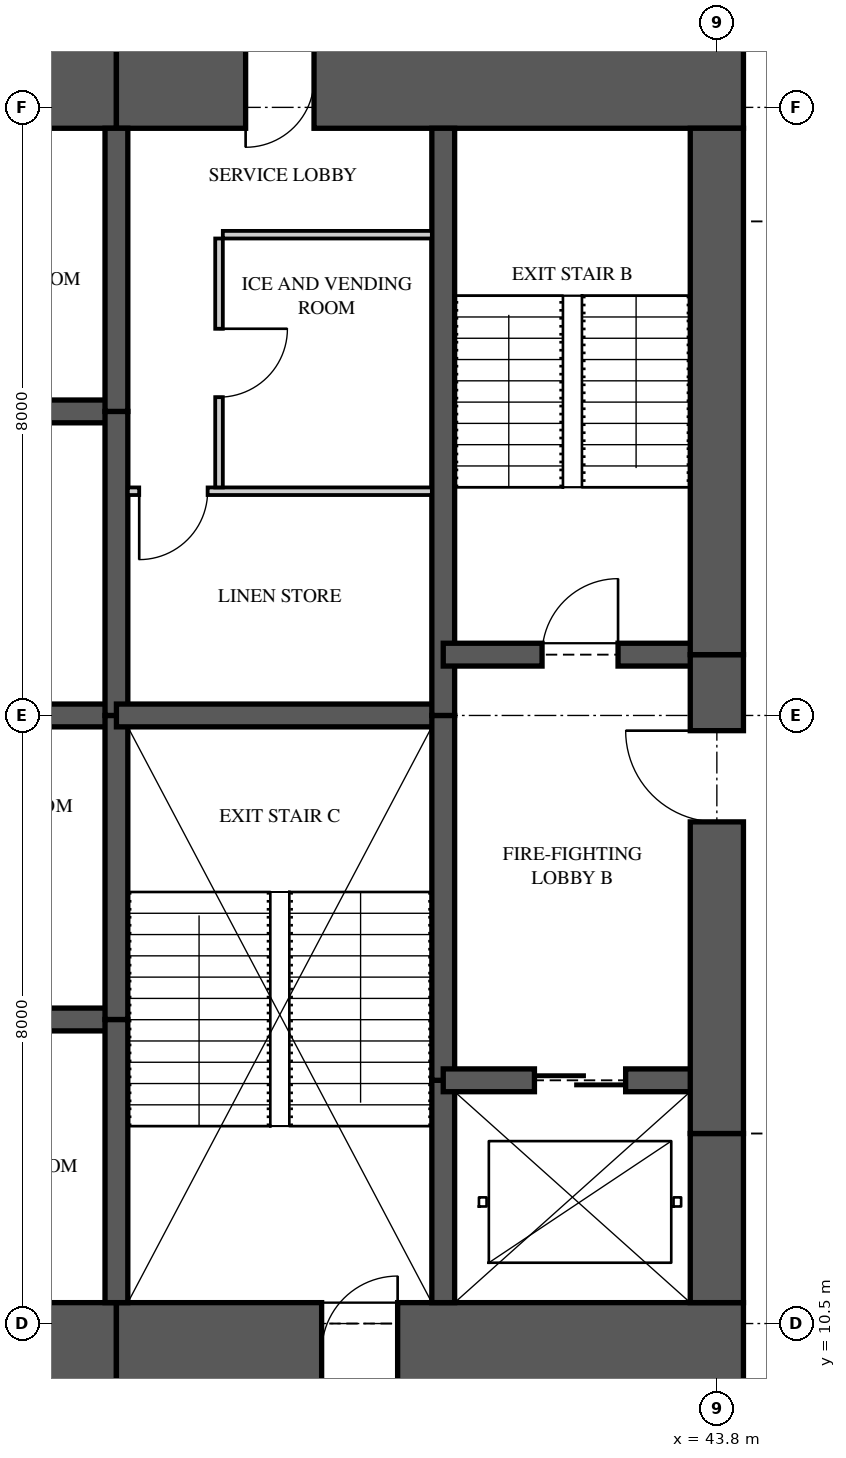
"""IFC4 building model, lengths in metres.
Left out: names, types, materials, properties, quantities, classifications, styles, units other than length and angle.
Written with IfcOpenShell. Run it as: python <this file> out.ifc"""

import sys

from ifc_helpers import new_model, si_unit, direction, frame, frame_2d, origin, place, context, subcontext, project, spatial, rectangle, extrude, element, fill, save


model = new_model("IFC4")
c1 = context("Model", 3, precision=1e-05, world=origin(), true_north=direction((0.0, 1.0)))
c2 = subcontext(c1, "Body", "Model", "MODEL_VIEW")
j1 = project(units=[si_unit("LENGTHUNIT", "METRE"), si_unit("PLANEANGLEUNIT", "RADIAN")], contexts=[c1])
p1 = place(None, origin())
s1 = spatial("IfcSite", under=j1, at=p1, CompositionType="ELEMENT")
p2 = place(p1, origin())
s2 = spatial("IfcBuilding", under=s1, at=p2, CompositionType="ELEMENT")
p3 = place(p2, frame((0.0, 0.0, 157.7)))
s3 = spatial("IfcBuildingStorey", under=s2, at=p3, CompositionType="ELEMENT", Elevation=157.7)
p4 = place(p3, frame((31.6, 10.125, 0.0), z_axis=(0.0, 0.0, 1.0), x_axis=(1.0, 0.0, 0.0)))
e1 = element("IfcWall", 1, at=p4, inside=s3, PredefinedType="SHEAR", context=c2, shape_type="SweptSolid", body=[
    extrude(rectangle(XDim=4.3, YDim=1.3, at=frame_2d((2.15, 0.0))), origin(), (0.0, 0.0, 1.0), 3.35),
])
p5 = place(p3, frame((35.9, 10.125, 0.0), z_axis=(0.0, 0.0, 1.0), x_axis=(1.0, 0.0, 0.0)))
e2 = element("IfcWall", 2, at=p5, inside=s3, PredefinedType="SHEAR", context=c2, shape_type="SweptSolid", body=[
    extrude(rectangle(XDim=8.25, YDim=1.3, at=frame_2d((4.125, 0.0))), origin(), (0.0, 0.0, 1.0), 3.35),
])
p6 = place(p5, frame((2.7, 0.0, 0.0)))
e3 = element("IfcOpeningElement", 3, at=p6, cuts=e2, PredefinedType="OPENING", context=c2, shape_type="SweptSolid", body=[
    extrude(rectangle(XDim=1.0, YDim=2.1, at=frame_2d((0.5, 1.05))), frame((0.0, 0.66, 0.0), z_axis=(0.0, -1.0, 0.0), x_axis=(1.0, 0.0, 0.0)), (0.0, 0.0, 1.0), 1.32),
])
p7 = place(p3, frame((44.15, 26.875, 0.0), z_axis=(0.0, 0.0, 1.0), x_axis=(-1.0, 0.0, 0.0)))
e4 = element("IfcWall", 4, at=p7, inside=s3, PredefinedType="SHEAR", context=c2, shape_type="SweptSolid", body=[
    extrude(rectangle(XDim=8.25, YDim=1.3, at=frame_2d((4.125, 0.0))), origin(), (0.0, 0.0, 1.0), 3.35),
])
p8 = place(p7, frame((5.65, 0.0, 0.0)))
e5 = element("IfcOpeningElement", 5, at=p8, cuts=e4, PredefinedType="OPENING", context=c2, shape_type="SweptSolid", body=[
    extrude(rectangle(XDim=0.9, YDim=2.1, at=frame_2d((0.45, 1.05))), frame((0.0, 0.66, 0.0), z_axis=(0.0, -1.0, 0.0), x_axis=(1.0, 0.0, 0.0)), (0.0, 0.0, 1.0), 1.32),
])
p9 = place(p3, frame((35.9, 26.875, 0.0), z_axis=(0.0, 0.0, 1.0), x_axis=(-1.0, 0.0, 0.0)))
e6 = element("IfcWall", 6, at=p9, inside=s3, PredefinedType="SHEAR", context=c2, shape_type="SweptSolid", body=[
    extrude(rectangle(XDim=4.3, YDim=1.3, at=frame_2d((2.15, 0.0))), origin(), (0.0, 0.0, 1.0), 3.35),
])
p10 = place(p3, frame((43.8, 10.775, 0.0), z_axis=(0.0, 0.0, 1.0), x_axis=(0.0, 1.0, 0.0)))
e7 = element("IfcWall", 7, at=p10, inside=s3, PredefinedType="SHEAR", context=c2, shape_type="SweptSolid", body=[
    extrude(rectangle(XDim=2.225, YDim=0.7, at=frame_2d((1.113, 0.0))), origin(), (0.0, 0.0, 1.0), 3.35),
])
p11 = place(p3, frame((43.8, 13.0, 0.0), z_axis=(0.0, 0.0, 1.0), x_axis=(0.0, 1.0, 0.0)))
e8 = element("IfcWall", 8, at=p11, inside=s3, PredefinedType="SHEAR", context=c2, shape_type="SweptSolid", body=[
    extrude(rectangle(XDim=6.3, YDim=0.7, at=frame_2d((3.15, 0.0))), origin(), (0.0, 0.0, 1.0), 3.35),
])
p12 = place(p11, frame((4.1, 0.0, 0.0)))
e9 = element("IfcOpeningElement", 9, at=p12, cuts=e8, PredefinedType="OPENING", context=c2, shape_type="SweptSolid", body=[
    extrude(rectangle(XDim=1.2, YDim=2.2, at=frame_2d((0.6, 1.1))), frame((0.0, 0.36, 0.0), z_axis=(0.0, -1.0, 0.0), x_axis=(1.0, 0.0, 0.0)), (0.0, 0.0, 1.0), 0.72),
])
p13 = place(p3, frame((43.8, 19.3, 0.0), z_axis=(0.0, 0.0, 1.0), x_axis=(0.0, 1.0, 0.0)))
e10 = element("IfcWall", 10, at=p13, inside=s3, PredefinedType="SHEAR", context=c2, shape_type="SweptSolid", body=[
    extrude(rectangle(XDim=6.925, YDim=0.7, at=frame_2d((3.462, 0.0))), origin(), (0.0, 0.0, 1.0), 3.35),
])
p14 = place(p3, frame((35.9, 10.775, 0.0), z_axis=(0.0, 0.0, 1.0), x_axis=(0.0, 1.0, 0.0)))
e11 = element("IfcWall", 11, at=p14, inside=s3, PredefinedType="SHEAR", context=c2, shape_type="SweptSolid", body=[
    extrude(rectangle(XDim=3.725, YDim=0.3, at=frame_2d((1.863, 0.0))), origin(), (0.0, 0.0, 1.0), 3.35),
])
for number, where, z_axis, x_axis in (
    (12, (35.9, 14.5, 0.0), (0.0, 0.0, 1.0), (0.0, 1.0, 0.0)),
    (13, (35.9, 18.5, 0.0), (0.0, 0.0, 1.0), (0.0, 1.0, 0.0)),
):
    element("IfcWall", number, at=place(p3, frame(where, z_axis=z_axis, x_axis=x_axis)), inside=s3, PredefinedType="SHEAR", context=c2, shape_type="SweptSolid", body=[
        extrude(rectangle(XDim=4.0, YDim=0.3, at=frame_2d((2.0, 0.0))), origin(), (0.0, 0.0, 1.0), 3.35),
    ])
p15 = place(p3, frame((35.9, 22.5, 0.0), z_axis=(0.0, 0.0, 1.0), x_axis=(0.0, 1.0, 0.0)))
e14 = element("IfcWall", 14, at=p15, inside=s3, PredefinedType="SHEAR", context=c2, shape_type="SweptSolid", body=[
    extrude(rectangle(XDim=3.725, YDim=0.3, at=frame_2d((1.863, 0.0))), origin(), (0.0, 0.0, 1.0), 3.35),
])
p16 = place(p3, frame((40.2, 10.775, 0.0), z_axis=(0.0, 0.0, 1.0), x_axis=(0.0, 1.0, 0.0)))
e15 = element("IfcWall", 15, at=p16, inside=s3, PredefinedType="SHEAR", context=c2, shape_type="SweptSolid", body=[
    extrude(rectangle(XDim=2.925, YDim=0.3, at=frame_2d((1.462, 0.0))), origin(), (0.0, 0.0, 1.0), 3.35),
])
p17 = place(p3, frame((40.2, 13.7, 0.0), z_axis=(0.0, 0.0, 1.0), x_axis=(0.0, 1.0, 0.0)))
e16 = element("IfcWall", 16, at=p17, inside=s3, PredefinedType="SHEAR", context=c2, shape_type="SweptSolid", body=[
    extrude(rectangle(XDim=4.8, YDim=0.3, at=frame_2d((2.4, 0.0))), origin(), (0.0, 0.0, 1.0), 3.35),
])
p18 = place(p3, frame((40.2, 18.5, 0.0), z_axis=(0.0, 0.0, 1.0), x_axis=(0.0, 1.0, 0.0)))
e17 = element("IfcWall", 17, at=p18, inside=s3, PredefinedType="SHEAR", context=c2, shape_type="SweptSolid", body=[
    extrude(rectangle(XDim=7.725, YDim=0.3, at=frame_2d((3.863, 0.0))), origin(), (0.0, 0.0, 1.0), 3.35),
])
for number, where, z_axis, x_axis in (
    (18, (31.6, 14.5, 0.0), (0.0, 0.0, 1.0), (1.0, 0.0, 0.0)),
    (19, (31.6, 18.5, 0.0), (0.0, 0.0, 1.0), (1.0, 0.0, 0.0)),
    (20, (31.6, 22.5, 0.0), (0.0, 0.0, 1.0), (1.0, 0.0, 0.0)),
):
    element("IfcWall", number, at=place(p3, frame(where, z_axis=z_axis, x_axis=x_axis)), inside=s3, PredefinedType="SHEAR", context=c2, shape_type="SweptSolid", body=[
        extrude(rectangle(XDim=4.3, YDim=0.3, at=frame_2d((2.15, 0.0))), origin(), (0.0, 0.0, 1.0), 3.35),
    ])
p19 = place(p3, frame((35.9, 18.5, 0.0), z_axis=(0.0, 0.0, 1.0), x_axis=(1.0, 0.0, 0.0)))
e21 = element("IfcWall", 21, at=p19, inside=s3, PredefinedType="SHEAR", context=c2, shape_type="SweptSolid", body=[
    extrude(rectangle(XDim=4.3, YDim=0.3, at=frame_2d((2.15, 0.0))), origin(), (0.0, 0.0, 1.0), 3.35),
])
p20 = place(p3, frame((40.2, 13.7, 0.0), z_axis=(0.0, 0.0, 1.0), x_axis=(1.0, 0.0, 0.0)))
e22 = element("IfcWall", 22, at=p20, inside=s3, PredefinedType="SHEAR", context=c2, shape_type="SweptSolid", body=[
    extrude(rectangle(XDim=3.6, YDim=0.3, at=frame_2d((1.8, 0.0))), origin(), (0.0, 0.0, 1.0), 3.35),
])
p21 = place(p20, frame((1.2, 0.0, 0.0)))
e23 = element("IfcOpeningElement", 23, at=p21, cuts=e22, PredefinedType="OPENING", context=c2, shape_type="SweptSolid", body=[
    extrude(rectangle(XDim=1.2, YDim=2.1, at=frame_2d((0.6, 1.05))), frame((0.0, 0.16, 0.0), z_axis=(0.0, -1.0, 0.0), x_axis=(1.0, 0.0, 0.0)), (0.0, 0.0, 1.0), 0.32),
])
p22 = place(p3, frame((40.2, 19.3, 0.0), z_axis=(0.0, 0.0, 1.0), x_axis=(1.0, 0.0, 0.0)))
e24 = element("IfcWall", 24, at=p22, inside=s3, PredefinedType="SHEAR", context=c2, shape_type="SweptSolid", body=[
    extrude(rectangle(XDim=3.6, YDim=0.3, at=frame_2d((1.8, 0.0))), origin(), (0.0, 0.0, 1.0), 3.35),
])
p23 = place(p22, frame((1.3, 0.0, 0.0)))
e25 = element("IfcOpeningElement", 25, at=p23, cuts=e24, PredefinedType="OPENING", context=c2, shape_type="SweptSolid", body=[
    extrude(rectangle(XDim=1.0, YDim=2.1, at=frame_2d((0.5, 1.05))), frame((0.0, 0.16, 0.0), z_axis=(0.0, -1.0, 0.0), x_axis=(1.0, 0.0, 0.0)), (0.0, 0.0, 1.0), 0.32),
])
p24 = place(p3, frame((37.3, 24.825, 0.0), z_axis=(0.0, 0.0, 1.0), x_axis=(1.0, 0.0, 0.0)))
e26 = element("IfcWall", 26, at=p24, inside=s3, PredefinedType="PARTITIONING", context=c2, shape_type="SweptSolid", body=[
    extrude(rectangle(XDim=2.75, YDim=0.1, at=frame_2d((1.375, 0.0))), origin(), (0.0, 0.0, 1.0), 3.11),
])
p25 = place(p3, frame((37.25, 21.5, 0.0), z_axis=(0.0, 0.0, 1.0), x_axis=(0.0, 1.0, 0.0)))
e27 = element("IfcWall", 27, at=p25, inside=s3, PredefinedType="PARTITIONING", context=c2, shape_type="SweptSolid", body=[
    extrude(rectangle(XDim=3.275, YDim=0.1, at=frame_2d((1.637, 0.0))), origin(), (0.0, 0.0, 1.0), 3.11),
])
p26 = place(p25, frame((1.188, 0.0, 0.0)))
e28 = element("IfcOpeningElement", 28, at=p26, cuts=e27, PredefinedType="OPENING", context=c2, shape_type="SweptSolid", body=[
    extrude(rectangle(XDim=0.9, YDim=2.1, at=frame_2d((0.45, 1.05))), frame((0.0, 0.06, 0.0), z_axis=(0.0, -1.0, 0.0), x_axis=(1.0, 0.0, 0.0)), (0.0, 0.0, 1.0), 0.12),
])
p27 = place(p3, frame((36.05, 21.45, 0.0), z_axis=(0.0, 0.0, 1.0), x_axis=(1.0, 0.0, 0.0)))
e29 = element("IfcWall", 29, at=p27, inside=s3, PredefinedType="PARTITIONING", context=c2, shape_type="SweptSolid", body=[
    extrude(rectangle(XDim=4.0, YDim=0.1, at=frame_2d((2.0, 0.0))), origin(), (0.0, 0.0, 1.0), 3.11),
])
p28 = place(p27, frame((0.15, 0.0, 0.0)))
e30 = element("IfcOpeningElement", 30, at=p28, cuts=e29, PredefinedType="OPENING", context=c2, shape_type="SweptSolid", body=[
    extrude(rectangle(XDim=0.9, YDim=2.1, at=frame_2d((0.45, 1.05))), frame((0.0, 0.06, 0.0), z_axis=(0.0, -1.0, 0.0), x_axis=(1.0, 0.0, 0.0)), (0.0, 0.0, 1.0), 0.12),
])
p29 = place(p26, frame((0.9, 0.0, 0.0), z_axis=(0.0, 0.0, 1.0), x_axis=(-1.0, 0.0, 0.0)))
e31 = element("IfcDoor", 31, at=p29, inside=s3, OperationType="SINGLE_SWING_LEFT", PredefinedType="DOOR", context=c2, shape_type="SweptSolid", body=[
    extrude(rectangle(XDim=0.9, YDim=2.1, at=frame_2d((0.45, 1.05))), frame((0.0, 0.025, 0.0), z_axis=(0.0, -1.0, 0.0), x_axis=(1.0, 0.0, 0.0)), (0.0, 0.0, 1.0), 0.05),
])
fill(e28, e31)
p30 = place(p28, frame((0.9, 0.0, 0.0), z_axis=(0.0, 0.0, 1.0), x_axis=(-1.0, 0.0, 0.0)))
e32 = element("IfcDoor", 32, at=p30, inside=s3, OperationType="SINGLE_SWING_RIGHT", PredefinedType="DOOR", context=c2, shape_type="SweptSolid", body=[
    extrude(rectangle(XDim=0.9, YDim=2.1, at=frame_2d((0.45, 1.05))), frame((0.0, 0.025, 0.0), z_axis=(0.0, -1.0, 0.0), x_axis=(1.0, 0.0, 0.0)), (0.0, 0.0, 1.0), 0.05),
])
fill(e30, e32)
p31 = place(p23, origin())
e33 = element("IfcDoor", 33, at=p31, inside=s3, OperationType="SINGLE_SWING_RIGHT", PredefinedType="DOOR", context=c2, shape_type="SweptSolid", body=[
    extrude(rectangle(XDim=1.0, YDim=2.1, at=frame_2d((0.5, 1.05))), frame((0.0, 0.025, 0.0), z_axis=(0.0, -1.0, 0.0), x_axis=(1.0, 0.0, 0.0)), (0.0, 0.0, 1.0), 0.05),
])
fill(e25, e33)
p32 = place(p12, origin())
e34 = element("IfcDoor", 34, at=p32, inside=s3, OperationType="SINGLE_SWING_RIGHT", PredefinedType="DOOR", context=c2, shape_type="SweptSolid", body=[
    extrude(rectangle(XDim=1.2, YDim=2.2, at=frame_2d((0.6, 1.1))), frame((0.0, 0.025, 0.0), z_axis=(0.0, -1.0, 0.0), x_axis=(1.0, 0.0, 0.0)), (0.0, 0.0, 1.0), 0.05),
])
fill(e9, e34)
p33 = place(p21, origin())
e35 = element("IfcDoor", 35, at=p33, inside=s3, OperationType="SLIDING_TO_LEFT", PredefinedType="DOOR", context=c2, shape_type="SweptSolid", body=[
    extrude(rectangle(XDim=1.2, YDim=2.1, at=frame_2d((0.6, 1.05))), frame((0.0, 0.025, 0.0), z_axis=(0.0, -1.0, 0.0), x_axis=(1.0, 0.0, 0.0)), (0.0, 0.0, 1.0), 0.05),
])
fill(e23, e35)
p34 = place(p6, origin())
e36 = element("IfcDoor", 36, at=p34, inside=s3, OperationType="SINGLE_SWING_RIGHT", PredefinedType="DOOR", context=c2, shape_type="SweptSolid", body=[
    extrude(rectangle(XDim=1.0, YDim=2.1, at=frame_2d((0.5, 1.05))), frame((0.0, 0.025, 0.0), z_axis=(0.0, -1.0, 0.0), x_axis=(1.0, 0.0, 0.0)), (0.0, 0.0, 1.0), 0.05),
])
fill(e3, e36)
p35 = place(p8, origin())
e37 = element("IfcDoor", 37, at=p35, inside=s3, OperationType="SINGLE_SWING_RIGHT", PredefinedType="DOOR", context=c2, shape_type="SweptSolid", body=[
    extrude(rectangle(XDim=0.9, YDim=2.1, at=frame_2d((0.45, 1.05))), frame((0.0, 0.47, 0.0), z_axis=(0.0, -1.0, 0.0), x_axis=(1.0, 0.0, 0.0)), (0.0, 0.0, 1.0), 0.8),
])
fill(e5, e37)
save(model, sys.argv[1])
